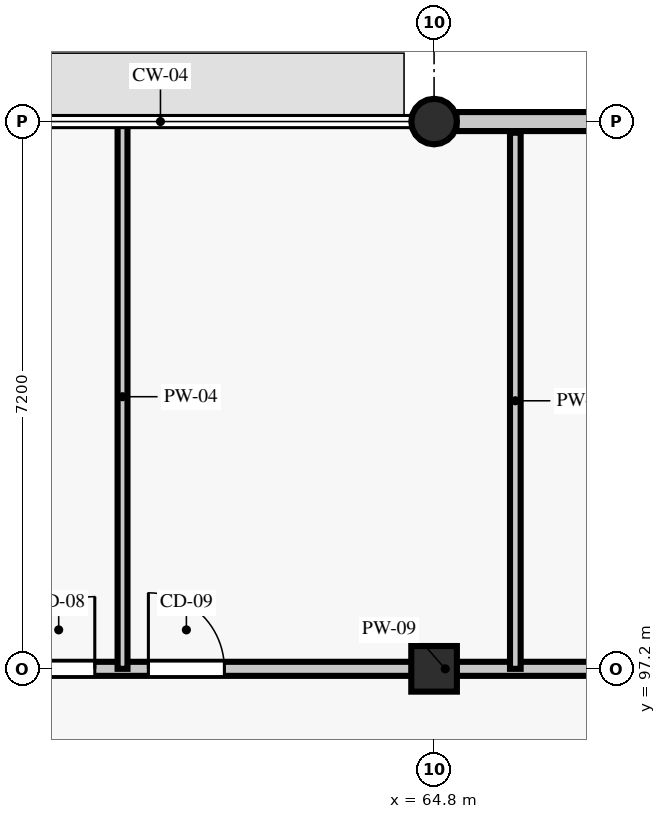
"""IFC4 building model, lengths in metres.
Left out: names, types, materials, properties, quantities, classifications, styles, units other than length and angle.
Written with IfcOpenShell. Run it as: python <this file> out.ifc"""

import sys

from ifc_helpers import new_model, si_unit, direction, frame, frame_2d, origin, origin_2d, place, context, subcontext, project, spatial, rectangle, circle, extrude, element, fill, save


model = new_model("IFC4")
c1 = context("Model", 3, precision=1e-05, world=origin(), true_north=direction((0.0, 1.0)))
c2 = subcontext(c1, "Body", "Model", "MODEL_VIEW")
j1 = project(units=[si_unit("LENGTHUNIT", "METRE"), si_unit("PLANEANGLEUNIT", "RADIAN")], contexts=[c1])
p1 = place(None, origin())
s1 = spatial("IfcSite", under=j1, at=p1, CompositionType="ELEMENT")
p2 = place(p1, origin())
s2 = spatial("IfcBuilding", under=s1, at=p2, CompositionType="ELEMENT")
p3 = place(p2, frame((0.0, 0.0, 13.8)))
s3 = spatial("IfcBuildingStorey", under=s2, at=p3, CompositionType="ELEMENT", Elevation=13.8)
p4 = place(p3, frame((64.8, 97.2, 0.0), z_axis=(0.0, 0.0, 1.0), x_axis=(1.0, 0.0, 0.0)))
e1 = element("IfcColumn", 1, at=p4, inside=s3, PredefinedType="COLUMN", context=c2, shape_type="SweptSolid", body=[
    extrude(rectangle(XDim=0.6, YDim=0.6, at=origin_2d()), origin(), (0.0, 0.0, 1.0), 3.945),
])
p5 = place(p3, frame((64.8, 104.4, 0.0), z_axis=(0.0, 0.0, 1.0), x_axis=(1.0, 0.0, 0.0)))
e2 = element("IfcColumn", 2, at=p5, inside=s3, PredefinedType="COLUMN", context=c2, shape_type="SweptSolid", body=[
    extrude(circle(Radius=0.3, at=origin_2d()), origin(), (0.0, 0.0, 1.0), 3.945),
])
p6 = place(p3, frame((71.705, 104.4, 0.0), z_axis=(0.0, 0.0, 1.0), x_axis=(-1.0, 0.0, 0.0)))
e3 = element("IfcWall", 3, at=p6, inside=s3, PredefinedType="STANDARD", context=c2, shape_type="SweptSolid", body=[
    extrude(rectangle(XDim=6.61, YDim=0.25, at=frame_2d((3.305, 0.0))), origin(), (0.0, 0.0, 1.0), 3.295),
])
p7 = place(p6, frame((2.405, 0.0, 0.9)))
e4 = element("IfcOpeningElement", 4, at=p7, cuts=e3, PredefinedType="OPENING", context=c2, shape_type="SweptSolid", body=[
    extrude(rectangle(XDim=1.8, YDim=1.54, at=frame_2d((0.9, 0.77))), frame((0.0, 0.135, 0.0), z_axis=(0.0, -1.0, 0.0), x_axis=(1.0, 0.0, 0.0)), (0.0, 0.0, 1.0), 0.27),
])
p8 = place(p3, frame((50.7, 97.2, 0.0), z_axis=(0.0, 0.0, 1.0), x_axis=(1.0, 0.0, 0.0)))
e5 = element("IfcWall", 5, at=p8, inside=s3, PredefinedType="PARTITIONING", context=c2, shape_type="SweptSolid", body=[
    extrude(rectangle(XDim=35.4, YDim=0.185, at=frame_2d((17.7, 0.0))), origin(), (0.0, 0.0, 1.0), 3.195),
])
p9 = place(p8, frame((3.124, 0.0, 0.0)))
e6 = element("IfcOpeningElement", 6, at=p9, cuts=e5, PredefinedType="OPENING", context=c2, shape_type="SweptSolid", body=[
    extrude(rectangle(XDim=0.9, YDim=2.13, at=frame_2d((0.45, 1.065))), frame((0.0, 0.103, 0.0), z_axis=(0.0, -1.0, 0.0), x_axis=(1.0, 0.0, 0.0)), (0.0, 0.0, 1.0), 0.205),
])
p10 = place(p8, frame((8.686, 0.0, 0.0)))
e7 = element("IfcOpeningElement", 7, at=p10, cuts=e5, PredefinedType="OPENING", context=c2, shape_type="SweptSolid", body=[
    extrude(rectangle(XDim=0.95, YDim=2.13, at=frame_2d((0.475, 1.065))), frame((0.0, 0.103, 0.0), z_axis=(0.0, -1.0, 0.0), x_axis=(1.0, 0.0, 0.0)), (0.0, 0.0, 1.0), 0.205),
])
p11 = place(p8, frame((10.341, 0.0, 0.0)))
e8 = element("IfcOpeningElement", 8, at=p11, cuts=e5, PredefinedType="OPENING", context=c2, shape_type="SweptSolid", body=[
    extrude(rectangle(XDim=1.0, YDim=2.13, at=frame_2d((0.5, 1.065))), frame((0.0, 0.103, 0.0), z_axis=(0.0, -1.0, 0.0), x_axis=(1.0, 0.0, 0.0)), (0.0, 0.0, 1.0), 0.205),
])
p12 = place(p8, frame((17.153, 0.0, 0.0)))
e9 = element("IfcOpeningElement", 9, at=p12, cuts=e5, PredefinedType="OPENING", context=c2, shape_type="SweptSolid", body=[
    extrude(rectangle(XDim=1.05, YDim=2.13, at=frame_2d((0.525, 1.065))), frame((0.0, 0.103, 0.0), z_axis=(0.0, -1.0, 0.0), x_axis=(1.0, 0.0, 0.0)), (0.0, 0.0, 1.0), 0.205),
])
p13 = place(p8, frame((22.28, 0.0, 0.0)))
e10 = element("IfcOpeningElement", 10, at=p13, cuts=e5, PredefinedType="OPENING", context=c2, shape_type="SweptSolid", body=[
    extrude(rectangle(XDim=0.92, YDim=2.18, at=frame_2d((0.46, 1.09))), frame((0.0, 0.103, 0.0), z_axis=(0.0, -1.0, 0.0), x_axis=(1.0, 0.0, 0.0)), (0.0, 0.0, 1.0), 0.205),
])
p14 = place(p8, frame((24.48, 0.0, 0.0)))
e11 = element("IfcOpeningElement", 11, at=p14, cuts=e5, PredefinedType="OPENING", context=c2, shape_type="SweptSolid", body=[
    extrude(rectangle(XDim=0.94, YDim=2.08, at=frame_2d((0.47, 1.04))), frame((0.0, 0.103, 0.0), z_axis=(0.0, -1.0, 0.0), x_axis=(1.0, 0.0, 0.0)), (0.0, 0.0, 1.0), 0.205),
])
p15 = place(p8, frame((26.77, 0.0, 0.0)))
e12 = element("IfcOpeningElement", 12, at=p15, cuts=e5, PredefinedType="OPENING", context=c2, shape_type="SweptSolid", body=[
    extrude(rectangle(XDim=0.9, YDim=2.08, at=frame_2d((0.45, 1.04))), frame((0.0, 0.103, 0.0), z_axis=(0.0, -1.0, 0.0), x_axis=(1.0, 0.0, 0.0)), (0.0, 0.0, 1.0), 0.205),
])
p16 = place(p8, frame((31.573, 0.0, 0.0)))
e13 = element("IfcOpeningElement", 13, at=p16, cuts=e5, PredefinedType="OPENING", context=c2, shape_type="SweptSolid", body=[
    extrude(rectangle(XDim=0.97, YDim=2.18, at=frame_2d((0.485, 1.09))), frame((0.0, 0.103, 0.0), z_axis=(0.0, -1.0, 0.0), x_axis=(1.0, 0.0, 0.0)), (0.0, 0.0, 1.0), 0.205),
])
p17 = place(p3, frame((60.701, 97.2, 0.0), z_axis=(0.0, 0.0, 1.0), x_axis=(0.0, 1.0, 0.0)))
e14 = element("IfcWall", 14, at=p17, inside=s3, PredefinedType="PARTITIONING", context=c2, shape_type="SweptSolid", body=[
    extrude(rectangle(XDim=7.16, YDim=0.13, at=frame_2d((3.58, 0.0))), origin(), (0.0, 0.0, 1.0), 3.195),
])
p18 = place(p3, frame((65.869, 97.2, 0.0), z_axis=(0.0, 0.0, 1.0), x_axis=(0.0, 1.0, 0.0)))
e15 = element("IfcWall", 15, at=p18, inside=s3, PredefinedType="PARTITIONING", context=c2, shape_type="SweptSolid", body=[
    extrude(rectangle(XDim=7.053, YDim=0.14, at=frame_2d((3.526, 0.0))), origin(), (0.0, 0.0, 1.0), 3.195),
])
p19 = place(p10, origin())
e16 = element("IfcDoor", 16, at=p19, inside=s3, OperationType="SINGLE_SWING_RIGHT", PredefinedType="DOOR", context=c2, shape_type="SweptSolid", body=[
    extrude(rectangle(XDim=0.95, YDim=2.13, at=frame_2d((0.475, 1.065))), frame((0.0, 0.025, 0.0), z_axis=(0.0, -1.0, 0.0), x_axis=(1.0, 0.0, 0.0)), (0.0, 0.0, 1.0), 0.05),
])
fill(e7, e16)
p20 = place(p11, origin())
e17 = element("IfcDoor", 17, at=p20, inside=s3, OperationType="SINGLE_SWING_LEFT", PredefinedType="DOOR", context=c2, shape_type="SweptSolid", body=[
    extrude(rectangle(XDim=1.0, YDim=2.13, at=frame_2d((0.5, 1.065))), frame((0.0, 0.025, 0.0), z_axis=(0.0, -1.0, 0.0), x_axis=(1.0, 0.0, 0.0)), (0.0, 0.0, 1.0), 0.05),
])
fill(e8, e17)
save(model, sys.argv[1])
